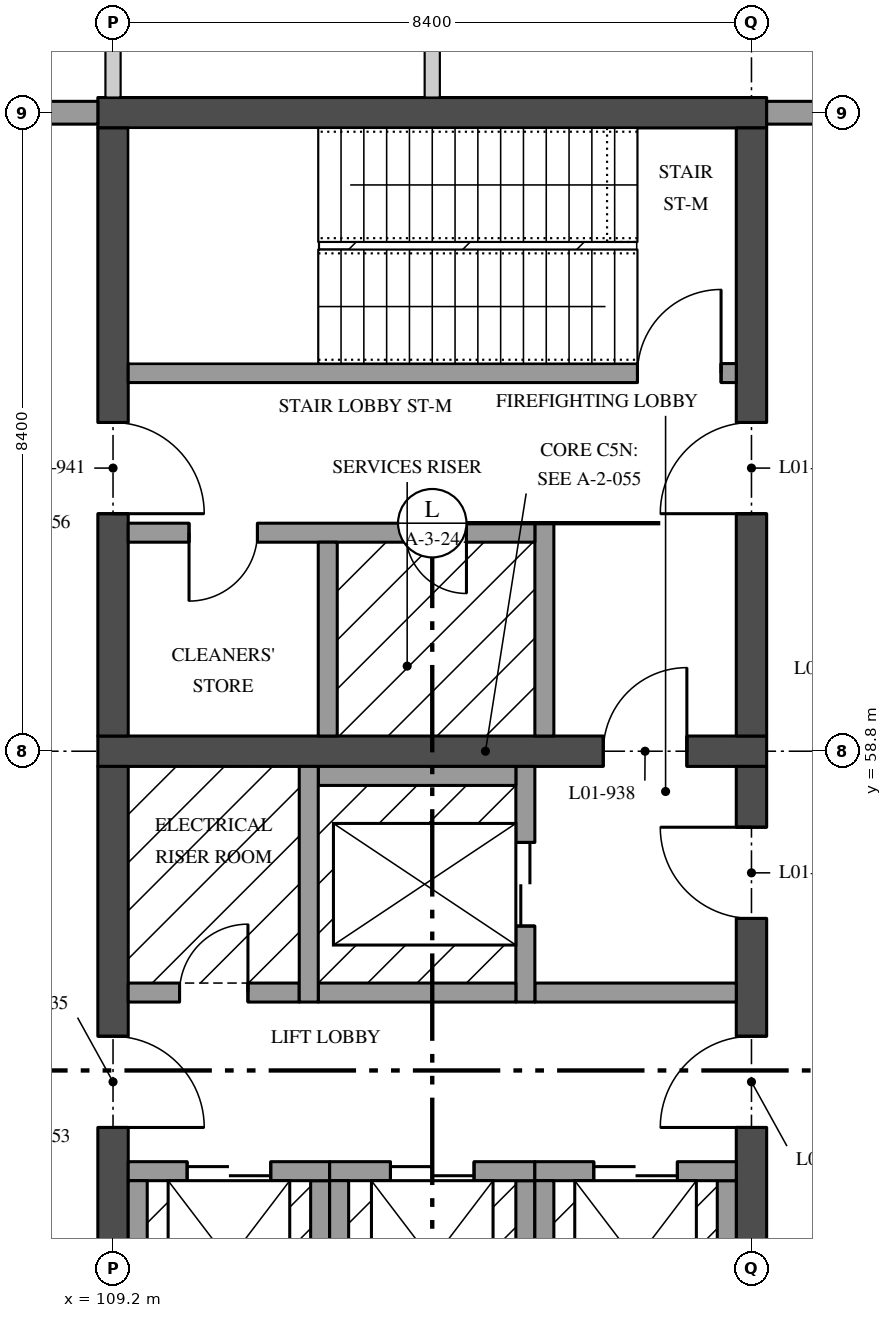
"""IFC4 building model, lengths in metres.
Left out: names, types, materials, properties, quantities, classifications, styles, units other than length and angle.
Written with IfcOpenShell. Run it as: python <this file> out.ifc"""

import sys

from ifc_helpers import new_model, si_unit, direction, frame, frame_2d, origin, place, context, subcontext, project, spatial, rectangle, extrude, element, fill, save


model = new_model("IFC4")
c1 = context("Model", 3, precision=1e-05, world=origin(), true_north=direction((0.0, 1.0)))
c2 = subcontext(c1, "Body", "Model", "MODEL_VIEW")
j1 = project(units=[si_unit("LENGTHUNIT", "METRE"), si_unit("PLANEANGLEUNIT", "RADIAN")], contexts=[c1])
p1 = place(None, origin())
s1 = spatial("IfcSite", under=j1, at=p1, CompositionType="ELEMENT")
p2 = place(p1, origin())
s2 = spatial("IfcBuilding", under=s1, at=p2, CompositionType="ELEMENT")
p3 = place(p2, frame((0.0, 0.0, 5.4)))
s3 = spatial("IfcBuildingStorey", under=s2, at=p3, CompositionType="ELEMENT", Elevation=5.4)
p4 = place(p3, frame((109.0, 58.8, 0.0), z_axis=(0.0, 0.0, 1.0), x_axis=(1.0, 0.0, 0.0)))
e1 = element("IfcWall", 1, at=p4, inside=s3, PredefinedType="SHEAR", context=c2, shape_type="SweptSolid", body=[
    extrude(rectangle(XDim=8.8, YDim=0.4, at=frame_2d((4.4, 0.0))), origin(), (0.0, 0.0, 1.0), 4.37),
])
p5 = place(p4, frame((6.65, 0.0, 0.0)))
e2 = element("IfcOpeningElement", 2, at=p5, cuts=e1, PredefinedType="OPENING", context=c2, shape_type="SweptSolid", body=[
    extrude(rectangle(XDim=1.1, YDim=2.1, at=frame_2d((0.55, 1.05))), frame((0.0, 0.21, 0.0), z_axis=(0.0, -1.0, 0.0), x_axis=(1.0, 0.0, 0.0)), (0.0, 0.0, 1.0), 0.42),
])
p6 = place(p3, frame((109.2, 50.6, 0.0), z_axis=(0.0, 0.0, 1.0), x_axis=(0.0, 1.0, 0.0)))
e3 = element("IfcWall", 3, at=p6, inside=s3, PredefinedType="SHEAR", context=c2, shape_type="SweptSolid", body=[
    extrude(rectangle(XDim=8.0, YDim=0.4, at=frame_2d((4.0, 0.0))), origin(), (0.0, 0.0, 1.0), 4.37),
])
p7 = place(p6, frame((3.25, 0.0, 0.0)))
e4 = element("IfcOpeningElement", 4, at=p7, cuts=e3, PredefinedType="OPENING", context=c2, shape_type="SweptSolid", body=[
    extrude(rectangle(XDim=1.2, YDim=2.1, at=frame_2d((0.6, 1.05))), frame((0.0, 0.21, 0.0), z_axis=(0.0, -1.0, 0.0), x_axis=(1.0, 0.0, 0.0)), (0.0, 0.0, 1.0), 0.42),
])
p8 = place(p3, frame((117.6, 50.6, 0.0), z_axis=(0.0, 0.0, 1.0), x_axis=(0.0, 1.0, 0.0)))
e5 = element("IfcWall", 5, at=p8, inside=s3, PredefinedType="SHEAR", context=c2, shape_type="SweptSolid", body=[
    extrude(rectangle(XDim=8.0, YDim=0.4, at=frame_2d((4.0, 0.0))), origin(), (0.0, 0.0, 1.0), 4.37),
])
p9 = place(p8, frame((3.25, 0.0, 0.0)))
e6 = element("IfcOpeningElement", 6, at=p9, cuts=e5, PredefinedType="OPENING", context=c2, shape_type="SweptSolid", body=[
    extrude(rectangle(XDim=1.2, YDim=2.1, at=frame_2d((0.6, 1.05))), frame((0.0, 0.21, 0.0), z_axis=(0.0, -1.0, 0.0), x_axis=(1.0, 0.0, 0.0)), (0.0, 0.0, 1.0), 0.42),
])
p10 = place(p8, frame((6.0, 0.0, 0.0)))
e7 = element("IfcOpeningElement", 7, at=p10, cuts=e5, PredefinedType="OPENING", context=c2, shape_type="SweptSolid", body=[
    extrude(rectangle(XDim=1.2, YDim=2.1, at=frame_2d((0.6, 1.05))), frame((0.0, 0.21, 0.0), z_axis=(0.0, -1.0, 0.0), x_axis=(1.0, 0.0, 0.0)), (0.0, 0.0, 1.0), 0.42),
])
p11 = place(p3, frame((109.4, 55.625, 0.0), z_axis=(0.0, 0.0, 1.0), x_axis=(1.0, 0.0, 0.0)))
e8 = element("IfcWall", 8, at=p11, inside=s3, PredefinedType="SOLIDWALL", context=c2, shape_type="SweptSolid", body=[
    extrude(rectangle(XDim=2.25, YDim=0.25, at=frame_2d((1.125, 0.0))), origin(), (0.0, 0.0, 1.0), 4.37),
])
p12 = place(p11, frame((0.675, 0.0, 0.0)))
e9 = element("IfcOpeningElement", 9, at=p12, cuts=e8, PredefinedType="OPENING", context=c2, shape_type="SweptSolid", body=[
    extrude(rectangle(XDim=0.9, YDim=2.1, at=frame_2d((0.45, 1.05))), frame((0.0, 0.135, 0.0), z_axis=(0.0, -1.0, 0.0), x_axis=(1.0, 0.0, 0.0)), (0.0, 0.0, 1.0), 0.27),
])
p13 = place(p3, frame((114.75, 55.625, 0.0), z_axis=(0.0, 0.0, 1.0), x_axis=(1.0, 0.0, 0.0)))
e10 = element("IfcWall", 10, at=p13, inside=s3, PredefinedType="SOLIDWALL", context=c2, shape_type="SweptSolid", body=[
    extrude(rectangle(XDim=2.65, YDim=0.25, at=frame_2d((1.325, 0.0))), origin(), (0.0, 0.0, 1.0), 4.37),
])
p14 = place(p3, frame((109.0, 67.2, 0.0), z_axis=(0.0, 0.0, 1.0), x_axis=(1.0, 0.0, 0.0)))
e11 = element("IfcWall", 11, at=p14, inside=s3, PredefinedType="SHEAR", context=c2, shape_type="SweptSolid", body=[
    extrude(rectangle(XDim=8.8, YDim=0.4, at=frame_2d((4.4, 0.0))), origin(), (0.0, 0.0, 1.0), 4.37),
])
p15 = place(p3, frame((109.2, 59.0, 0.0), z_axis=(0.0, 0.0, 1.0), x_axis=(0.0, 1.0, 0.0)))
e12 = element("IfcWall", 12, at=p15, inside=s3, PredefinedType="SHEAR", context=c2, shape_type="SweptSolid", body=[
    extrude(rectangle(XDim=8.0, YDim=0.4, at=frame_2d((4.0, 0.0))), origin(), (0.0, 0.0, 1.0), 4.37),
])
p16 = place(p15, frame((2.925, 0.0, 0.0)))
e13 = element("IfcOpeningElement", 13, at=p16, cuts=e12, PredefinedType="OPENING", context=c2, shape_type="SweptSolid", body=[
    extrude(rectangle(XDim=1.2, YDim=2.1, at=frame_2d((0.6, 1.05))), frame((0.0, 0.21, 0.0), z_axis=(0.0, -1.0, 0.0), x_axis=(1.0, 0.0, 0.0)), (0.0, 0.0, 1.0), 0.42),
])
p17 = place(p3, frame((117.6, 59.0, 0.0), z_axis=(0.0, 0.0, 1.0), x_axis=(0.0, 1.0, 0.0)))
e14 = element("IfcWall", 14, at=p17, inside=s3, PredefinedType="SHEAR", context=c2, shape_type="SweptSolid", body=[
    extrude(rectangle(XDim=8.0, YDim=0.4, at=frame_2d((4.0, 0.0))), origin(), (0.0, 0.0, 1.0), 4.37),
])
p18 = place(p17, frame((2.925, 0.0, 0.0)))
e15 = element("IfcOpeningElement", 15, at=p18, cuts=e14, PredefinedType="OPENING", context=c2, shape_type="SweptSolid", body=[
    extrude(rectangle(XDim=1.2, YDim=2.1, at=frame_2d((0.6, 1.05))), frame((0.0, 0.21, 0.0), z_axis=(0.0, -1.0, 0.0), x_axis=(1.0, 0.0, 0.0)), (0.0, 0.0, 1.0), 0.42),
])
p19 = place(p3, frame((117.4, 63.775, 0.0), z_axis=(0.0, 0.0, 1.0), x_axis=(-1.0, 0.0, 0.0)))
e16 = element("IfcWall", 16, at=p19, inside=s3, PredefinedType="SOLIDWALL", context=c2, shape_type="SweptSolid", body=[
    extrude(rectangle(XDim=8.0, YDim=0.25, at=frame_2d((4.0, 0.0))), origin(), (0.0, 0.0, 1.0), 4.37),
])
p20 = place(p19, frame((0.2, 0.0, 0.0)))
e17 = element("IfcOpeningElement", 17, at=p20, cuts=e16, PredefinedType="OPENING", context=c2, shape_type="SweptSolid", body=[
    extrude(rectangle(XDim=1.1, YDim=2.1, at=frame_2d((0.55, 1.05))), frame((0.0, 0.135, 0.0), z_axis=(0.0, -1.0, 0.0), x_axis=(1.0, 0.0, 0.0)), (0.0, 0.0, 1.0), 0.27),
])
p21 = place(p3, frame((114.875, 61.8, 0.0), z_axis=(0.0, 0.0, 1.0), x_axis=(0.0, -1.0, 0.0)))
e18 = element("IfcWall", 18, at=p21, inside=s3, PredefinedType="SOLIDWALL", context=c2, shape_type="SweptSolid", body=[
    extrude(rectangle(XDim=2.8, YDim=0.25, at=frame_2d((1.4, 0.0))), origin(), (0.0, 0.0, 1.0), 4.37),
])
p22 = place(p3, frame((114.75, 61.675, 0.0), z_axis=(0.0, 0.0, 1.0), x_axis=(-1.0, 0.0, 0.0)))
e19 = element("IfcWall", 19, at=p22, inside=s3, PredefinedType="SOLIDWALL", context=c2, shape_type="SweptSolid", body=[
    extrude(rectangle(XDim=5.35, YDim=0.25, at=frame_2d((2.675, 0.0))), origin(), (0.0, 0.0, 1.0), 4.37),
])
p23 = place(p22, frame((3.65, 0.0, 0.0)))
e20 = element("IfcOpeningElement", 20, at=p23, cuts=e19, PredefinedType="OPENING", context=c2, shape_type="SweptSolid", body=[
    extrude(rectangle(XDim=0.9, YDim=2.1, at=frame_2d((0.45, 1.05))), frame((0.0, 0.135, 0.0), z_axis=(0.0, -1.0, 0.0), x_axis=(1.0, 0.0, 0.0)), (0.0, 0.0, 1.0), 0.27),
])
p24 = place(p22, frame((0.9, 0.0, 0.0)))
e21 = element("IfcOpeningElement", 21, at=p24, cuts=e19, PredefinedType="OPENING", context=c2, shape_type="SweptSolid", body=[
    extrude(rectangle(XDim=0.8, YDim=2.1, at=frame_2d((0.4, 1.05))), frame((0.0, 0.135, 0.0), z_axis=(0.0, -1.0, 0.0), x_axis=(1.0, 0.0, 0.0)), (0.0, 0.0, 1.0), 0.27),
])
p25 = place(p3, frame((112.025, 61.55, 0.0), z_axis=(0.0, 0.0, 1.0), x_axis=(0.0, -1.0, 0.0)))
e22 = element("IfcWall", 22, at=p25, inside=s3, PredefinedType="SOLIDWALL", context=c2, shape_type="SweptSolid", body=[
    extrude(rectangle(XDim=2.55, YDim=0.25, at=frame_2d((1.275, 0.0))), origin(), (0.0, 0.0, 1.0), 4.37),
])
p26 = place(p3, frame((114.625, 55.5, 0.0), z_axis=(0.0, 0.0, 1.0), x_axis=(0.0, 1.0, 0.0)))
e23 = element("IfcWall", 23, at=p26, inside=s3, PredefinedType="SOLIDWALL", context=c2, shape_type="SweptSolid", body=[
    extrude(rectangle(XDim=3.1, YDim=0.25, at=frame_2d((1.55, 0.0))), origin(), (0.0, 0.0, 1.0), 4.37),
])
p27 = place(p26, frame((1.0, 0.0, 0.0)))
e24 = element("IfcOpeningElement", 24, at=p27, cuts=e23, PredefinedType="OPENING", context=c2, shape_type="SweptSolid", body=[
    extrude(rectangle(XDim=1.1, YDim=2.1, at=frame_2d((0.55, 1.05))), frame((0.0, 0.135, 0.0), z_axis=(0.0, -1.0, 0.0), x_axis=(1.0, 0.0, 0.0)), (0.0, 0.0, 1.0), 0.27),
])
for number, where, z_axis, x_axis in (
    (25, (111.9, 58.475, 0.0), (0.0, 0.0, 1.0), (1.0, 0.0, 0.0)),
    (26, (111.9, 55.625, 0.0), (0.0, 0.0, 1.0), (1.0, 0.0, 0.0)),
):
    element("IfcWall", number, at=place(p3, frame(where, z_axis=z_axis, x_axis=x_axis)), inside=s3, PredefinedType="SOLIDWALL", context=c2, shape_type="SweptSolid", body=[
        extrude(rectangle(XDim=2.6, YDim=0.25, at=frame_2d((1.3, 0.0))), origin(), (0.0, 0.0, 1.0), 4.37),
    ])
p28 = place(p3, frame((111.775, 55.5, 0.0), z_axis=(0.0, 0.0, 1.0), x_axis=(0.0, 1.0, 0.0)))
e27 = element("IfcWall", 27, at=p28, inside=s3, PredefinedType="SOLIDWALL", context=c2, shape_type="SweptSolid", body=[
    extrude(rectangle(XDim=3.1, YDim=0.25, at=frame_2d((1.55, 0.0))), origin(), (0.0, 0.0, 1.0), 4.37),
])
p29 = place(p3, frame((111.925, 50.85, 0.0), z_axis=(0.0, 0.0, 1.0), x_axis=(0.0, 1.0, 0.0)))
e28 = element("IfcWall", 28, at=p29, inside=s3, PredefinedType="SOLIDWALL", context=c2, shape_type="SweptSolid", body=[
    extrude(rectangle(XDim=2.3, YDim=0.25, at=frame_2d((1.15, 0.0))), origin(), (0.0, 0.0, 1.0), 4.37),
])
p30 = place(p3, frame((109.4, 53.275, 0.0), z_axis=(0.0, 0.0, 1.0), x_axis=(1.0, 0.0, 0.0)))
e29 = element("IfcWall", 29, at=p30, inside=s3, PredefinedType="SOLIDWALL", context=c2, shape_type="SweptSolid", body=[
    extrude(rectangle(XDim=2.65, YDim=0.25, at=frame_2d((1.325, 0.0))), origin(), (0.0, 0.0, 1.0), 4.37),
])
p31 = place(p30, frame((0.775, 0.0, 0.0)))
e30 = element("IfcOpeningElement", 30, at=p31, cuts=e29, PredefinedType="OPENING", context=c2, shape_type="SweptSolid", body=[
    extrude(rectangle(XDim=1.1, YDim=2.1, at=frame_2d((0.55, 1.05))), frame((0.0, 0.135, 0.0), z_axis=(0.0, -1.0, 0.0), x_axis=(1.0, 0.0, 0.0)), (0.0, 0.0, 1.0), 0.27),
])
for number, where, z_axis, x_axis in (
    (31, (109.525, 50.85, 0.0), (0.0, 0.0, 1.0), (0.0, 1.0, 0.0)),
    (32, (114.625, 50.85, 0.0), (0.0, 0.0, 1.0), (0.0, 1.0, 0.0)),
):
    element("IfcWall", number, at=place(p3, frame(where, z_axis=z_axis, x_axis=x_axis)), inside=s3, PredefinedType="SOLIDWALL", context=c2, shape_type="SweptSolid", body=[
        extrude(rectangle(XDim=2.3, YDim=0.25, at=frame_2d((1.15, 0.0))), origin(), (0.0, 0.0, 1.0), 4.37),
    ])
p32 = place(p3, frame((112.05, 53.275, 0.0), z_axis=(0.0, 0.0, 1.0), x_axis=(1.0, 0.0, 0.0)))
e33 = element("IfcWall", 33, at=p32, inside=s3, PredefinedType="SOLIDWALL", context=c2, shape_type="SweptSolid", body=[
    extrude(rectangle(XDim=2.7, YDim=0.25, at=frame_2d((1.35, 0.0))), origin(), (0.0, 0.0, 1.0), 4.37),
])
p33 = place(p32, frame((0.8, 0.0, 0.0)))
e34 = element("IfcOpeningElement", 34, at=p33, cuts=e33, PredefinedType="OPENING", context=c2, shape_type="SweptSolid", body=[
    extrude(rectangle(XDim=1.1, YDim=2.1, at=frame_2d((0.55, 1.05))), frame((0.0, 0.135, 0.0), z_axis=(0.0, -1.0, 0.0), x_axis=(1.0, 0.0, 0.0)), (0.0, 0.0, 1.0), 0.27),
])
for number, where, z_axis, x_axis in (
    (35, (112.175, 50.85, 0.0), (0.0, 0.0, 1.0), (0.0, 1.0, 0.0)),
    (36, (117.275, 50.85, 0.0), (0.0, 0.0, 1.0), (0.0, 1.0, 0.0)),
):
    element("IfcWall", number, at=place(p3, frame(where, z_axis=z_axis, x_axis=x_axis)), inside=s3, PredefinedType="SOLIDWALL", context=c2, shape_type="SweptSolid", body=[
        extrude(rectangle(XDim=2.3, YDim=0.25, at=frame_2d((1.15, 0.0))), origin(), (0.0, 0.0, 1.0), 4.37),
    ])
p34 = place(p3, frame((114.75, 53.275, 0.0), z_axis=(0.0, 0.0, 1.0), x_axis=(1.0, 0.0, 0.0)))
e37 = element("IfcWall", 37, at=p34, inside=s3, PredefinedType="SOLIDWALL", context=c2, shape_type="SweptSolid", body=[
    extrude(rectangle(XDim=2.65, YDim=0.25, at=frame_2d((1.325, 0.0))), origin(), (0.0, 0.0, 1.0), 4.37),
])
p35 = place(p34, frame((0.775, 0.0, 0.0)))
e38 = element("IfcOpeningElement", 38, at=p35, cuts=e37, PredefinedType="OPENING", context=c2, shape_type="SweptSolid", body=[
    extrude(rectangle(XDim=1.1, YDim=2.1, at=frame_2d((0.55, 1.05))), frame((0.0, 0.135, 0.0), z_axis=(0.0, -1.0, 0.0), x_axis=(1.0, 0.0, 0.0)), (0.0, 0.0, 1.0), 0.27),
])
p36 = place(p3, frame((114.875, 50.85, 0.0), z_axis=(0.0, 0.0, 1.0), x_axis=(0.0, 1.0, 0.0)))
e39 = element("IfcWall", 39, at=p36, inside=s3, PredefinedType="SOLIDWALL", context=c2, shape_type="SweptSolid", body=[
    extrude(rectangle(XDim=2.3, YDim=0.25, at=frame_2d((1.15, 0.0))), origin(), (0.0, 0.0, 1.0), 4.37),
])
p37 = place(p3, frame((109.2, 67.4, 0.0), z_axis=(0.0, 0.0, 1.0), x_axis=(0.0, 1.0, 0.0)))
e40 = element("IfcWall", 40, at=p37, inside=s3, PredefinedType="PARTITIONING", context=c2, shape_type="SweptSolid", body=[
    extrude(rectangle(XDim=6.6, YDim=0.2, at=frame_2d((3.3, 0.0))), origin(), (0.0, 0.0, 1.0), 3.746),
])
p38 = place(p3, frame((113.4, 67.4, 0.0), z_axis=(0.0, 0.0, 1.0), x_axis=(0.0, 1.0, 0.0)))
e41 = element("IfcWall", 41, at=p38, inside=s3, PredefinedType="PARTITIONING", context=c2, shape_type="SweptSolid", body=[
    extrude(rectangle(XDim=6.6, YDim=0.2, at=frame_2d((3.3, 0.0))), origin(), (0.0, 0.0, 1.0), 4.37),
])
for number, where, z_axis, x_axis in (
    (42, (125.57, 67.2, 0.0), (0.0, 0.0, 1.0), (-1.0, 0.0, 0.0)),
    (43, (109.0, 67.2, 0.0), (0.0, 0.0, 1.0), (-1.0, 0.0, 0.0)),
):
    element("IfcWall", number, at=place(p3, frame(where, z_axis=z_axis, x_axis=x_axis)), inside=s3, PredefinedType="SOLIDWALL", context=c2, shape_type="SweptSolid", body=[
        extrude(rectangle(XDim=7.77, YDim=0.3, at=frame_2d((3.885, 0.0))), origin(), (0.0, 0.0, 1.0), 3.746),
    ])
p39 = place(p7, frame((1.2, 0.0, 0.0), z_axis=(0.0, 0.0, 1.0), x_axis=(-1.0, 0.0, 0.0)))
e44 = element("IfcDoor", 44, at=p39, inside=s3, OperationType="SINGLE_SWING_LEFT", PredefinedType="DOOR", context=c2, shape_type="SweptSolid", body=[
    extrude(rectangle(XDim=1.2, YDim=2.1, at=frame_2d((0.6, 1.05))), frame((0.0, 0.035, 0.0), z_axis=(0.0, -1.0, 0.0), x_axis=(1.0, 0.0, 0.0)), (0.0, 0.0, 1.0), 0.07),
])
fill(e4, e44)
p40 = place(p9, origin())
e45 = element("IfcDoor", 45, at=p40, inside=s3, OperationType="SINGLE_SWING_RIGHT", PredefinedType="DOOR", context=c2, shape_type="SweptSolid", body=[
    extrude(rectangle(XDim=1.2, YDim=2.1, at=frame_2d((0.6, 1.05))), frame((0.0, 0.035, 0.0), z_axis=(0.0, -1.0, 0.0), x_axis=(1.0, 0.0, 0.0)), (0.0, 0.0, 1.0), 0.07),
])
fill(e6, e45)
p41 = place(p10, origin())
e46 = element("IfcDoor", 46, at=p41, inside=s3, OperationType="SINGLE_SWING_LEFT", PredefinedType="DOOR", context=c2, shape_type="SweptSolid", body=[
    extrude(rectangle(XDim=1.2, YDim=2.1, at=frame_2d((0.6, 1.05))), frame((0.0, 0.035, 0.0), z_axis=(0.0, -1.0, 0.0), x_axis=(1.0, 0.0, 0.0)), (0.0, 0.0, 1.0), 0.07),
])
fill(e7, e46)
p42 = place(p5, origin())
e47 = element("IfcDoor", 47, at=p42, inside=s3, OperationType="SINGLE_SWING_LEFT", PredefinedType="DOOR", context=c2, shape_type="SweptSolid", body=[
    extrude(rectangle(XDim=1.1, YDim=2.1, at=frame_2d((0.55, 1.05))), frame((0.0, 0.035, 0.0), z_axis=(0.0, -1.0, 0.0), x_axis=(1.0, 0.0, 0.0)), (0.0, 0.0, 1.0), 0.07),
])
fill(e2, e47)
p43 = place(p12, origin())
e48 = element("IfcDoor", 48, at=p43, inside=s3, OperationType="SINGLE_SWING_LEFT", PredefinedType="DOOR", context=c2, shape_type="SweptSolid", body=[
    extrude(rectangle(XDim=0.9, YDim=2.1, at=frame_2d((0.45, 1.05))), frame((0.0, 0.05, 0.0), z_axis=(0.0, -1.0, 0.0), x_axis=(1.0, 0.0, 0.0)), (0.0, 0.0, 1.0), 0.1),
])
fill(e9, e48)
p44 = place(p23, origin())
e49 = element("IfcDoor", 49, at=p44, inside=s3, OperationType="SINGLE_SWING_LEFT", PredefinedType="DOOR", context=c2, shape_type="SweptSolid", body=[
    extrude(rectangle(XDim=0.9, YDim=2.1, at=frame_2d((0.45, 1.05))), frame((0.0, 0.035, 0.0), z_axis=(0.0, -1.0, 0.0), x_axis=(1.0, 0.0, 0.0)), (0.0, 0.0, 1.0), 0.07),
])
fill(e20, e49)
p45 = place(p16, frame((1.2, 0.0, 0.0), z_axis=(0.0, 0.0, 1.0), x_axis=(-1.0, 0.0, 0.0)))
e50 = element("IfcDoor", 50, at=p45, inside=s3, OperationType="SINGLE_SWING_LEFT", PredefinedType="DOOR", context=c2, shape_type="SweptSolid", body=[
    extrude(rectangle(XDim=1.2, YDim=2.1, at=frame_2d((0.6, 1.05))), frame((0.0, 0.035, 0.0), z_axis=(0.0, -1.0, 0.0), x_axis=(1.0, 0.0, 0.0)), (0.0, 0.0, 1.0), 0.07),
])
fill(e13, e50)
p46 = place(p18, origin())
e51 = element("IfcDoor", 51, at=p46, inside=s3, OperationType="SINGLE_SWING_RIGHT", PredefinedType="DOOR", context=c2, shape_type="SweptSolid", body=[
    extrude(rectangle(XDim=1.2, YDim=2.1, at=frame_2d((0.6, 1.05))), frame((0.0, 0.035, 0.0), z_axis=(0.0, -1.0, 0.0), x_axis=(1.0, 0.0, 0.0)), (0.0, 0.0, 1.0), 0.07),
])
fill(e15, e51)
p47 = place(p24, origin())
e52 = element("IfcDoor", 52, at=p47, inside=s3, OperationType="SINGLE_SWING_RIGHT", PredefinedType="DOOR", context=c2, shape_type="SweptSolid", body=[
    extrude(rectangle(XDim=0.8, YDim=2.1, at=frame_2d((0.4, 1.05))), frame((0.0, 0.035, 0.0), z_axis=(0.0, -1.0, 0.0), x_axis=(1.0, 0.0, 0.0)), (0.0, 0.0, 1.0), 0.07),
])
fill(e21, e52)
p48 = place(p20, frame((1.1, 0.0, 0.0), z_axis=(0.0, 0.0, 1.0), x_axis=(-1.0, 0.0, 0.0)))
e53 = element("IfcDoor", 53, at=p48, inside=s3, OperationType="SINGLE_SWING_LEFT", PredefinedType="DOOR", context=c2, shape_type="SweptSolid", body=[
    extrude(rectangle(XDim=1.1, YDim=2.1, at=frame_2d((0.55, 1.05))), frame((0.0, 0.035, 0.0), z_axis=(0.0, -1.0, 0.0), x_axis=(1.0, 0.0, 0.0)), (0.0, 0.0, 1.0), 0.07),
])
fill(e17, e53)
p49 = place(p27, origin())
e54 = element("IfcDoor", 54, at=p49, inside=s3, OperationType="DOUBLE_DOOR_SLIDING", PredefinedType="DOOR", context=c2, shape_type="SweptSolid", body=[
    extrude(rectangle(XDim=1.1, YDim=2.1, at=frame_2d((0.55, 1.05))), frame((0.0, 0.04, 0.0), z_axis=(0.0, -1.0, 0.0), x_axis=(1.0, 0.0, 0.0)), (0.0, 0.0, 1.0), 0.08),
])
fill(e24, e54)
p50 = place(p31, origin())
e55 = element("IfcDoor", 55, at=p50, inside=s3, OperationType="DOUBLE_DOOR_SLIDING", PredefinedType="DOOR", context=c2, shape_type="SweptSolid", body=[
    extrude(rectangle(XDim=1.1, YDim=2.1, at=frame_2d((0.55, 1.05))), frame((0.0, 0.04, 0.0), z_axis=(0.0, -1.0, 0.0), x_axis=(1.0, 0.0, 0.0)), (0.0, 0.0, 1.0), 0.08),
])
fill(e30, e55)
p51 = place(p33, origin())
e56 = element("IfcDoor", 56, at=p51, inside=s3, OperationType="DOUBLE_DOOR_SLIDING", PredefinedType="DOOR", context=c2, shape_type="SweptSolid", body=[
    extrude(rectangle(XDim=1.1, YDim=2.1, at=frame_2d((0.55, 1.05))), frame((0.0, 0.04, 0.0), z_axis=(0.0, -1.0, 0.0), x_axis=(1.0, 0.0, 0.0)), (0.0, 0.0, 1.0), 0.08),
])
fill(e34, e56)
p52 = place(p35, origin())
e57 = element("IfcDoor", 57, at=p52, inside=s3, OperationType="DOUBLE_DOOR_SLIDING", PredefinedType="DOOR", context=c2, shape_type="SweptSolid", body=[
    extrude(rectangle(XDim=1.1, YDim=2.1, at=frame_2d((0.55, 1.05))), frame((0.0, 0.04, 0.0), z_axis=(0.0, -1.0, 0.0), x_axis=(1.0, 0.0, 0.0)), (0.0, 0.0, 1.0), 0.08),
])
fill(e38, e57)
save(model, sys.argv[1])
